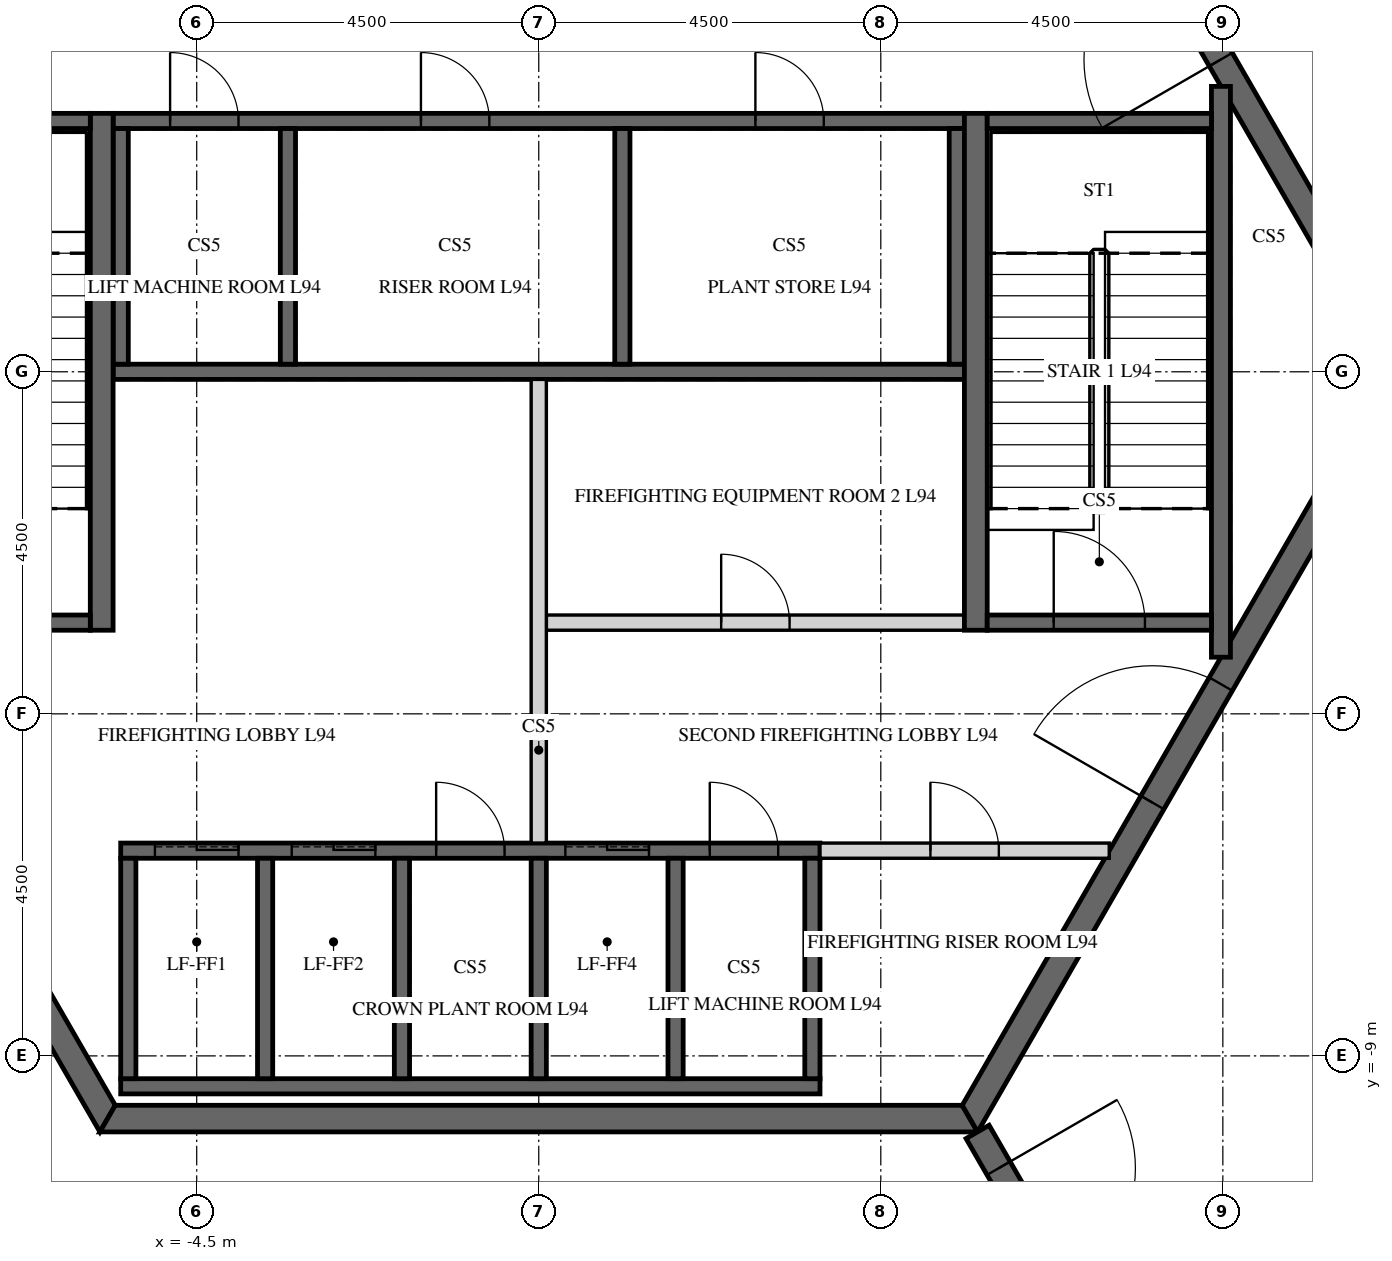
"""IFC4 building model, lengths in metres.
Left out: names, types, materials, properties, quantities, classifications, styles, units other than length and angle.
Written with IfcOpenShell. Run it as: python <this file> out.ifc"""

import sys

from ifc_helpers import new_model, si_unit, direction, frame, frame_2d, origin, place, context, subcontext, project, spatial, polyline, rectangle, outline, extrude, element, fill, save


model = new_model("IFC4")
c1 = context("Model", 3, precision=1e-05, world=origin(), true_north=direction((0.0, 1.0)))
c2 = subcontext(c1, "Body", "Model", "MODEL_VIEW")
j1 = project(units=[si_unit("LENGTHUNIT", "METRE"), si_unit("PLANEANGLEUNIT", "RADIAN")], contexts=[c1])
p1 = place(None, origin())
s1 = spatial("IfcSite", under=j1, at=p1, CompositionType="ELEMENT")
p2 = place(p1, origin())
s2 = spatial("IfcBuilding", under=s1, at=p2, CompositionType="ELEMENT")
p3 = place(p2, frame((0.0, 0.0, 397.2)))
s3 = spatial("IfcBuildingStorey", under=s2, at=p3, CompositionType="ELEMENT", Elevation=397.2)
p4 = place(p3, frame((9.618, 14.174, 4.5), z_axis=(0.0, 0.0, 1.0), x_axis=(0.559191500603, -0.8290385188, 0.0)))
e1 = element("IfcWall", 1, at=p4, inside=s3, PredefinedType="PARAPET", context=c2, shape_type="SweptSolid", body=[
    extrude(outline(polyline([(0.008, -0.1), (13.852, -0.1), (13.871, 0.1), (-0.008, 0.1), (0.008, -0.1)])), origin(), (0.0, 0.0, 1.0), 1.1),
])
p5 = place(p3, frame((-5.673, 9.825, -0.2), z_axis=(0.0, 0.0, 1.0), x_axis=(-0.499995046907, -0.866028263435, 0.0)))
e2 = element("IfcWall", 2, at=p5, inside=s3, PredefinedType="SHEAR", context=c2, shape_type="SweptSolid", body=[
    extrude(outline(polyline([(-0.101, -0.175), (11.446, -0.175), (11.244, 0.175), (0.101, 0.175), (-0.101, -0.175)])), origin(), (0.0, 0.0, 1.0), 4.5),
])
p6 = place(p5, frame((4.801, 0.0, 0.2)))
e3 = element("IfcOpeningElement", 3, at=p6, cuts=e2, PredefinedType="OPENING", context=c2, shape_type="SweptSolid", body=[
    extrude(rectangle(XDim=1.8, YDim=2.4, at=frame_2d((0.9, 1.2))), frame((0.0, 0.185, 0.0), z_axis=(0.0, -1.0, 0.0), x_axis=(1.0, 0.0, 0.0)), (0.0, 0.0, 1.0), 0.37),
])
p7 = place(p3, frame((-11.345, 0.0, -0.2), z_axis=(0.0, 0.0, 1.0), x_axis=(0.499995046907, -0.866028263435, 0.0)))
e4 = element("IfcWall", 4, at=p7, inside=s3, PredefinedType="SHEAR", context=c2, shape_type="SweptSolid", body=[
    extrude(outline(polyline([(-0.101, -0.175), (11.446, -0.175), (11.244, 0.175), (0.101, 0.175), (-0.101, -0.175)])), origin(), (0.0, 0.0, 1.0), 4.5),
])
p8 = place(p7, frame((4.744, 0.0, 0.2)))
e5 = element("IfcOpeningElement", 5, at=p8, cuts=e4, PredefinedType="OPENING", context=c2, shape_type="SweptSolid", body=[
    extrude(rectangle(XDim=1.8, YDim=2.4, at=frame_2d((0.9, 1.2))), frame((0.0, 0.185, 0.0), z_axis=(0.0, -1.0, 0.0), x_axis=(1.0, 0.0, 0.0)), (0.0, 0.0, 1.0), 0.37),
])
p9 = place(p3, frame((-5.673, -9.825, -0.2), z_axis=(0.0, 0.0, 1.0), x_axis=(1.0, 0.0, 0.0)))
e6 = element("IfcWall", 6, at=p9, inside=s3, PredefinedType="SHEAR", context=c2, shape_type="SweptSolid", body=[
    extrude(outline(polyline([(-0.101, -0.175), (11.446, -0.175), (11.244, 0.175), (0.101, 0.175), (-0.101, -0.175)])), origin(), (0.0, 0.0, 1.0), 4.5),
])
p10 = place(p3, frame((5.673, -9.825, -0.2), z_axis=(0.0, 0.0, 1.0), x_axis=(0.499995046907, 0.866028263435, 0.0)))
e7 = element("IfcWall", 7, at=p10, inside=s3, PredefinedType="SHEAR", context=c2, shape_type="SweptSolid", body=[
    extrude(outline(polyline([(-0.101, -0.175), (11.446, -0.175), (11.244, 0.175), (0.101, 0.175), (-0.101, -0.175)])), origin(), (0.0, 0.0, 1.0), 4.5),
])
p11 = place(p10, frame((4.801, 0.0, 0.2)))
e8 = element("IfcOpeningElement", 8, at=p11, cuts=e7, PredefinedType="OPENING", context=c2, shape_type="SweptSolid", body=[
    extrude(rectangle(XDim=1.8, YDim=2.4, at=frame_2d((0.9, 1.2))), frame((0.0, 0.185, 0.0), z_axis=(0.0, -1.0, 0.0), x_axis=(1.0, 0.0, 0.0)), (0.0, 0.0, 1.0), 0.37),
])
p12 = place(p3, frame((11.345, 0.0, -0.2), z_axis=(0.0, 0.0, 1.0), x_axis=(-0.499995046907, 0.866028263435, 0.0)))
e9 = element("IfcWall", 9, at=p12, inside=s3, PredefinedType="SHEAR", context=c2, shape_type="SweptSolid", body=[
    extrude(outline(polyline([(-0.101, -0.175), (11.446, -0.175), (11.244, 0.175), (0.101, 0.175), (-0.101, -0.175)])), origin(), (0.0, 0.0, 1.0), 4.5),
])
p13 = place(p12, frame((4.744, 0.0, 0.2)))
e10 = element("IfcOpeningElement", 10, at=p13, cuts=e9, PredefinedType="OPENING", context=c2, shape_type="SweptSolid", body=[
    extrude(rectangle(XDim=1.8, YDim=2.4, at=frame_2d((0.9, 1.2))), frame((0.0, 0.185, 0.0), z_axis=(0.0, -1.0, 0.0), x_axis=(1.0, 0.0, 0.0)), (0.0, 0.0, 1.0), 0.37),
])
p14 = place(p3, frame((5.773, -10.0, -0.2), z_axis=(0.0, 0.0, 1.0), x_axis=(0.499991653138, -0.866030222794, 0.0)))
e11 = element("IfcWall", 11, at=p14, inside=s3, PredefinedType="SHEAR", context=c2, shape_type="SweptSolid", body=[
    extrude(rectangle(XDim=5.705, YDim=0.35, at=frame_2d((2.852, 0.0))), origin(), (0.0, 0.0, 1.0), 4.5),
])
p15 = place(p14, frame((0.552, 0.0, 0.2)))
e12 = element("IfcOpeningElement", 12, at=p15, cuts=e11, PredefinedType="OPENING", context=c2, shape_type="SweptSolid", body=[
    extrude(rectangle(XDim=1.8, YDim=2.4, at=frame_2d((0.9, 1.2))), frame((0.0, 0.185, 0.0), z_axis=(0.0, -1.0, 0.0), x_axis=(1.0, 0.0, 0.0)), (0.0, 0.0, 1.0), 0.37),
])
p16 = place(p3, frame((-5.6, 3.3, -0.2), z_axis=(0.0, 0.0, 1.0), x_axis=(1.0, 0.0, 0.0)))
e13 = element("IfcWall", 13, at=p16, inside=s3, PredefinedType="SHEAR", context=c2, shape_type="SweptSolid", body=[
    extrude(rectangle(XDim=11.2, YDim=0.2, at=frame_2d((5.6, 0.0))), origin(), (0.0, 0.0, 1.0), 4.5),
])
p17 = place(p16, frame((0.75, 0.0, 0.2)))
e14 = element("IfcOpeningElement", 14, at=p17, cuts=e13, PredefinedType="OPENING", context=c2, shape_type="SweptSolid", body=[
    extrude(rectangle(XDim=0.9, YDim=2.1, at=frame_2d((0.45, 1.05))), frame((0.0, 0.11, 0.0), z_axis=(0.0, -1.0, 0.0), x_axis=(1.0, 0.0, 0.0)), (0.0, 0.0, 1.0), 0.22),
])
p18 = place(p16, frame((4.05, 0.0, 0.2)))
e15 = element("IfcOpeningElement", 15, at=p18, cuts=e13, PredefinedType="OPENING", context=c2, shape_type="SweptSolid", body=[
    extrude(rectangle(XDim=0.9, YDim=2.1, at=frame_2d((0.45, 1.05))), frame((0.0, 0.11, 0.0), z_axis=(0.0, -1.0, 0.0), x_axis=(1.0, 0.0, 0.0)), (0.0, 0.0, 1.0), 0.22),
])
p19 = place(p16, frame((8.45, 0.0, 0.2)))
e16 = element("IfcOpeningElement", 16, at=p19, cuts=e13, PredefinedType="OPENING", context=c2, shape_type="SweptSolid", body=[
    extrude(rectangle(XDim=0.9, YDim=2.1, at=frame_2d((0.45, 1.05))), frame((0.0, 0.11, 0.0), z_axis=(0.0, -1.0, 0.0), x_axis=(1.0, 0.0, 0.0)), (0.0, 0.0, 1.0), 0.22),
])
p20 = place(p3, frame((-5.6, 0.0, -0.2), z_axis=(0.0, 0.0, 1.0), x_axis=(1.0, 0.0, 0.0)))
e17 = element("IfcWall", 17, at=p20, inside=s3, PredefinedType="SHEAR", context=c2, shape_type="SweptSolid", body=[
    extrude(rectangle(XDim=11.2, YDim=0.2, at=frame_2d((5.6, 0.0))), origin(), (0.0, 0.0, 1.0), 4.5),
])
for number, where, z_axis, x_axis in (
    (18, (-5.5, 0.1, -0.2), (0.0, 0.0, 1.0), (0.0, 1.0, 0.0)),
    (19, (-3.3, 0.1, -0.2), (0.0, 0.0, 1.0), (0.0, 1.0, 0.0)),
    (20, (1.1, 0.1, -0.2), (0.0, 0.0, 1.0), (0.0, 1.0, 0.0)),
    (21, (5.5, 0.1, -0.2), (0.0, 0.0, 1.0), (0.0, 1.0, 0.0)),
):
    element("IfcWall", number, at=place(p3, frame(where, z_axis=z_axis, x_axis=x_axis)), inside=s3, PredefinedType="SHEAR", context=c2, shape_type="SweptSolid", body=[
        extrude(rectangle(XDim=3.1, YDim=0.2, at=frame_2d((1.55, 0.0))), origin(), (0.0, 0.0, 1.0), 4.5),
    ])
p21 = place(p3, frame((-5.5, -6.3, -0.2), z_axis=(0.0, 0.0, 1.0), x_axis=(1.0, 0.0, 0.0)))
e22 = element("IfcWall", 22, at=p21, inside=s3, PredefinedType="SHEAR", context=c2, shape_type="SweptSolid", body=[
    extrude(rectangle(XDim=9.2, YDim=0.2, at=frame_2d((4.6, 0.0))), origin(), (0.0, 0.0, 1.0), 4.5),
])
p22 = place(p21, frame((4.15, 0.0, 0.2)))
e23 = element("IfcOpeningElement", 23, at=p22, cuts=e22, PredefinedType="OPENING", context=c2, shape_type="SweptSolid", body=[
    extrude(rectangle(XDim=0.9, YDim=2.1, at=frame_2d((0.45, 1.05))), frame((0.0, 0.11, 0.0), z_axis=(0.0, -1.0, 0.0), x_axis=(1.0, 0.0, 0.0)), (0.0, 0.0, 1.0), 0.22),
])
p23 = place(p21, frame((7.75, 0.0, 0.2)))
e24 = element("IfcOpeningElement", 24, at=p23, cuts=e22, PredefinedType="OPENING", context=c2, shape_type="SweptSolid", body=[
    extrude(rectangle(XDim=0.9, YDim=2.1, at=frame_2d((0.45, 1.05))), frame((0.0, 0.11, 0.0), z_axis=(0.0, -1.0, 0.0), x_axis=(1.0, 0.0, 0.0)), (0.0, 0.0, 1.0), 0.22),
])
p24 = place(p21, frame((0.45, 0.0, 0.2)))
e25 = element("IfcOpeningElement", 25, at=p24, cuts=e22, PredefinedType="OPENING", context=c2, shape_type="SweptSolid", body=[
    extrude(rectangle(XDim=1.1, YDim=2.1, at=frame_2d((0.55, 1.05))), frame((0.0, 0.11, 0.0), z_axis=(0.0, -1.0, 0.0), x_axis=(1.0, 0.0, 0.0)), (0.0, 0.0, 1.0), 0.22),
])
p25 = place(p21, frame((2.25, 0.0, 0.2)))
e26 = element("IfcOpeningElement", 26, at=p25, cuts=e22, PredefinedType="OPENING", context=c2, shape_type="SweptSolid", body=[
    extrude(rectangle(XDim=1.1, YDim=2.1, at=frame_2d((0.55, 1.05))), frame((0.0, 0.11, 0.0), z_axis=(0.0, -1.0, 0.0), x_axis=(1.0, 0.0, 0.0)), (0.0, 0.0, 1.0), 0.22),
])
p26 = place(p21, frame((5.85, 0.0, 0.2)))
e27 = element("IfcOpeningElement", 27, at=p26, cuts=e22, PredefinedType="OPENING", context=c2, shape_type="SweptSolid", body=[
    extrude(rectangle(XDim=1.1, YDim=2.1, at=frame_2d((0.55, 1.05))), frame((0.0, 0.11, 0.0), z_axis=(0.0, -1.0, 0.0), x_axis=(1.0, 0.0, 0.0)), (0.0, 0.0, 1.0), 0.22),
])
p27 = place(p3, frame((-5.5, -9.4, -0.2), z_axis=(0.0, 0.0, 1.0), x_axis=(1.0, 0.0, 0.0)))
e28 = element("IfcWall", 28, at=p27, inside=s3, PredefinedType="SHEAR", context=c2, shape_type="SweptSolid", body=[
    extrude(rectangle(XDim=9.2, YDim=0.2, at=frame_2d((4.6, 0.0))), origin(), (0.0, 0.0, 1.0), 4.5),
])
for number, where, z_axis, x_axis in (
    (29, (-5.4, -9.3, -0.2), (0.0, 0.0, 1.0), (0.0, 1.0, 0.0)),
    (30, (-3.6, -9.3, -0.2), (0.0, 0.0, 1.0), (0.0, 1.0, 0.0)),
    (31, (-1.8, -9.3, -0.2), (0.0, 0.0, 1.0), (0.0, 1.0, 0.0)),
    (32, (0.0, -9.3, -0.2), (0.0, 0.0, 1.0), (0.0, 1.0, 0.0)),
    (33, (1.8, -9.3, -0.2), (0.0, 0.0, 1.0), (0.0, 1.0, 0.0)),
    (34, (3.6, -9.3, -0.2), (0.0, 0.0, 1.0), (0.0, 1.0, 0.0)),
):
    element("IfcWall", number, at=place(p3, frame(where, z_axis=z_axis, x_axis=x_axis)), inside=s3, PredefinedType="SHEAR", context=c2, shape_type="SweptSolid", body=[
        extrude(rectangle(XDim=2.9, YDim=0.2, at=frame_2d((1.45, 0.0))), origin(), (0.0, 0.0, 1.0), 4.5),
    ])
p28 = place(p3, frame((0.1, -3.3, 0.0), z_axis=(0.0, 0.0, 1.0), x_axis=(1.0, 0.0, 0.0)))
e35 = element("IfcWall", 35, at=p28, inside=s3, PredefinedType="PARTITIONING", context=c2, shape_type="SweptSolid", body=[
    extrude(rectangle(XDim=5.5, YDim=0.2, at=frame_2d((2.75, 0.0))), origin(), (0.0, 0.0, 1.0), 4.3),
])
p29 = place(p28, frame((2.3, 0.0, 0.0)))
e36 = element("IfcOpeningElement", 36, at=p29, cuts=e35, PredefinedType="OPENING", context=c2, shape_type="SweptSolid", body=[
    extrude(rectangle(XDim=0.9, YDim=2.1, at=frame_2d((0.45, 1.05))), frame((0.0, 0.11, 0.0), z_axis=(0.0, -1.0, 0.0), x_axis=(1.0, 0.0, 0.0)), (0.0, 0.0, 1.0), 0.22),
])
p30 = place(p3, frame((0.0, -6.2, 0.0), z_axis=(0.0, 0.0, 1.0), x_axis=(0.0, 1.0, 0.0)))
e37 = element("IfcWall", 37, at=p30, inside=s3, PredefinedType="PARTITIONING", context=c2, shape_type="SweptSolid", body=[
    extrude(rectangle(XDim=6.1, YDim=0.2, at=frame_2d((3.05, 0.0))), origin(), (0.0, 0.0, 1.0), 4.3),
])
p31 = place(p3, frame((3.7, -6.3, 0.0), z_axis=(0.0, 0.0, 1.0), x_axis=(1.0, 0.0, 0.0)))
e38 = element("IfcWall", 38, at=p31, inside=s3, PredefinedType="PARTITIONING", context=c2, shape_type="SweptSolid", body=[
    extrude(rectangle(XDim=3.806, YDim=0.2, at=frame_2d((1.903, 0.0))), origin(), (0.0, 0.0, 1.0), 4.3),
])
p32 = place(p31, frame((1.453, 0.0, 0.0)))
e39 = element("IfcOpeningElement", 39, at=p32, cuts=e38, PredefinedType="OPENING", context=c2, shape_type="SweptSolid", body=[
    extrude(rectangle(XDim=0.9, YDim=2.1, at=frame_2d((0.45, 1.05))), frame((0.0, 0.11, 0.0), z_axis=(0.0, -1.0, 0.0), x_axis=(1.0, 0.0, 0.0)), (0.0, 0.0, 1.0), 0.22),
])
p33 = place(p3, frame((5.75, -3.4, -0.2), z_axis=(0.0, 0.0, 1.0), x_axis=(0.0, 1.0, 0.0)))
e40 = element("IfcWall", 40, at=p33, inside=s3, PredefinedType="SHEAR", context=c2, shape_type="SweptSolid", body=[
    extrude(rectangle(XDim=6.8, YDim=0.3, at=frame_2d((3.4, 0.0))), origin(), (0.0, 0.0, 1.0), 4.5),
])
p34 = place(p3, frame((8.975, -3.755, -0.2), z_axis=(0.0, 0.0, 1.0), x_axis=(0.0, 1.0, 0.0)))
e41 = element("IfcWall", 41, at=p34, inside=s3, PredefinedType="SHEAR", context=c2, shape_type="SweptSolid", body=[
    extrude(rectangle(XDim=7.51, YDim=0.25, at=frame_2d((3.755, 0.0))), origin(), (0.0, 0.0, 1.0), 4.5),
])
p35 = place(p3, frame((5.9, 3.3, -0.2), z_axis=(0.0, 0.0, 1.0), x_axis=(1.0, 0.0, 0.0)))
e42 = element("IfcWall", 42, at=p35, inside=s3, PredefinedType="SHEAR", context=c2, shape_type="SweptSolid", body=[
    extrude(rectangle(XDim=2.95, YDim=0.2, at=frame_2d((1.475, 0.0))), origin(), (0.0, 0.0, 1.0), 4.5),
])
p36 = place(p3, frame((5.9, -3.3, -0.2), z_axis=(0.0, 0.0, 1.0), x_axis=(1.0, 0.0, 0.0)))
e43 = element("IfcWall", 43, at=p36, inside=s3, PredefinedType="SHEAR", context=c2, shape_type="SweptSolid", body=[
    extrude(rectangle(XDim=2.95, YDim=0.2, at=frame_2d((1.475, 0.0))), origin(), (0.0, 0.0, 1.0), 4.5),
])
p37 = place(p36, frame((0.875, 0.0, 0.2)))
e44 = element("IfcOpeningElement", 44, at=p37, cuts=e43, PredefinedType="OPENING", context=c2, shape_type="SweptSolid", body=[
    extrude(rectangle(XDim=1.2, YDim=2.4, at=frame_2d((0.6, 1.2))), frame((0.0, 0.11, 0.0), z_axis=(0.0, -1.0, 0.0), x_axis=(1.0, 0.0, 0.0)), (0.0, 0.0, 1.0), 0.22),
])
p38 = place(p3, frame((-5.75, -3.4, -0.2), z_axis=(0.0, 0.0, 1.0), x_axis=(0.0, 1.0, 0.0)))
e45 = element("IfcWall", 45, at=p38, inside=s3, PredefinedType="SHEAR", context=c2, shape_type="SweptSolid", body=[
    extrude(rectangle(XDim=6.8, YDim=0.3, at=frame_2d((3.4, 0.0))), origin(), (0.0, 0.0, 1.0), 4.5),
])
p39 = place(p3, frame((-8.85, 3.3, -0.2), z_axis=(0.0, 0.0, 1.0), x_axis=(1.0, 0.0, 0.0)))
e46 = element("IfcWall", 46, at=p39, inside=s3, PredefinedType="SHEAR", context=c2, shape_type="SweptSolid", body=[
    extrude(rectangle(XDim=2.95, YDim=0.2, at=frame_2d((1.475, 0.0))), origin(), (0.0, 0.0, 1.0), 4.5),
])
p40 = place(p3, frame((-8.85, -3.3, -0.2), z_axis=(0.0, 0.0, 1.0), x_axis=(1.0, 0.0, 0.0)))
e47 = element("IfcWall", 47, at=p40, inside=s3, PredefinedType="SHEAR", context=c2, shape_type="SweptSolid", body=[
    extrude(rectangle(XDim=2.95, YDim=0.2, at=frame_2d((1.475, 0.0))), origin(), (0.0, 0.0, 1.0), 4.5),
])
p41 = place(p40, frame((0.875, 0.0, 0.2)))
e48 = element("IfcOpeningElement", 48, at=p41, cuts=e47, PredefinedType="OPENING", context=c2, shape_type="SweptSolid", body=[
    extrude(rectangle(XDim=1.2, YDim=2.4, at=frame_2d((0.6, 1.2))), frame((0.0, 0.11, 0.0), z_axis=(0.0, -1.0, 0.0), x_axis=(1.0, 0.0, 0.0)), (0.0, 0.0, 1.0), 0.22),
])
p42 = place(p13, origin())
e49 = element("IfcDoor", 49, at=p42, inside=s3, OperationType="DOUBLE_DOOR_SINGLE_SWING", PredefinedType="DOOR", context=c2, shape_type="SweptSolid", body=[
    extrude(rectangle(XDim=1.8, YDim=2.4, at=frame_2d((0.9, 1.2))), frame((0.0, 0.025, 0.0), z_axis=(0.0, -1.0, 0.0), x_axis=(1.0, 0.0, 0.0)), (0.0, 0.0, 1.0), 0.05),
])
fill(e10, e49)
p43 = place(p11, origin())
e50 = element("IfcDoor", 50, at=p43, inside=s3, OperationType="DOUBLE_DOOR_SINGLE_SWING", PredefinedType="DOOR", context=c2, shape_type="SweptSolid", body=[
    extrude(rectangle(XDim=1.8, YDim=2.4, at=frame_2d((0.9, 1.2))), frame((0.0, 0.025, 0.0), z_axis=(0.0, -1.0, 0.0), x_axis=(1.0, 0.0, 0.0)), (0.0, 0.0, 1.0), 0.05),
])
fill(e8, e50)
p44 = place(p15, origin())
e51 = element("IfcDoor", 51, at=p44, inside=s3, OperationType="DOUBLE_DOOR_SINGLE_SWING", PredefinedType="DOOR", context=c2, shape_type="SweptSolid", body=[
    extrude(rectangle(XDim=1.8, YDim=2.4, at=frame_2d((0.9, 1.2))), frame((0.0, 0.025, 0.0), z_axis=(0.0, -1.0, 0.0), x_axis=(1.0, 0.0, 0.0)), (0.0, 0.0, 1.0), 0.05),
])
fill(e12, e51)
p45 = place(p29, origin())
e52 = element("IfcDoor", 52, at=p45, inside=s3, OperationType="SINGLE_SWING_LEFT", PredefinedType="DOOR", context=c2, shape_type="SweptSolid", body=[
    extrude(rectangle(XDim=0.9, YDim=2.1, at=frame_2d((0.45, 1.05))), frame((0.0, 0.025, 0.0), z_axis=(0.0, -1.0, 0.0), x_axis=(1.0, 0.0, 0.0)), (0.0, 0.0, 1.0), 0.05),
])
fill(e36, e52)
p46 = place(p32, origin())
e53 = element("IfcDoor", 53, at=p46, inside=s3, OperationType="SINGLE_SWING_LEFT", PredefinedType="DOOR", context=c2, shape_type="SweptSolid", body=[
    extrude(rectangle(XDim=0.9, YDim=2.1, at=frame_2d((0.45, 1.05))), frame((0.0, 0.025, 0.0), z_axis=(0.0, -1.0, 0.0), x_axis=(1.0, 0.0, 0.0)), (0.0, 0.0, 1.0), 0.05),
])
fill(e39, e53)
p47 = place(p17, origin())
e54 = element("IfcDoor", 54, at=p47, inside=s3, OperationType="SINGLE_SWING_LEFT", PredefinedType="DOOR", context=c2, shape_type="SweptSolid", body=[
    extrude(rectangle(XDim=0.9, YDim=2.1, at=frame_2d((0.45, 1.05))), frame((0.0, 0.025, 0.0), z_axis=(0.0, -1.0, 0.0), x_axis=(1.0, 0.0, 0.0)), (0.0, 0.0, 1.0), 0.05),
])
fill(e14, e54)
p48 = place(p18, origin())
e55 = element("IfcDoor", 55, at=p48, inside=s3, OperationType="SINGLE_SWING_LEFT", PredefinedType="DOOR", context=c2, shape_type="SweptSolid", body=[
    extrude(rectangle(XDim=0.9, YDim=2.1, at=frame_2d((0.45, 1.05))), frame((0.0, 0.025, 0.0), z_axis=(0.0, -1.0, 0.0), x_axis=(1.0, 0.0, 0.0)), (0.0, 0.0, 1.0), 0.05),
])
fill(e15, e55)
p49 = place(p19, origin())
e56 = element("IfcDoor", 56, at=p49, inside=s3, OperationType="SINGLE_SWING_LEFT", PredefinedType="DOOR", context=c2, shape_type="SweptSolid", body=[
    extrude(rectangle(XDim=0.9, YDim=2.1, at=frame_2d((0.45, 1.05))), frame((0.0, 0.025, 0.0), z_axis=(0.0, -1.0, 0.0), x_axis=(1.0, 0.0, 0.0)), (0.0, 0.0, 1.0), 0.05),
])
fill(e16, e56)
p50 = place(p22, origin())
e57 = element("IfcDoor", 57, at=p50, inside=s3, OperationType="SINGLE_SWING_LEFT", PredefinedType="DOOR", context=c2, shape_type="SweptSolid", body=[
    extrude(rectangle(XDim=0.9, YDim=2.1, at=frame_2d((0.45, 1.05))), frame((0.0, 0.025, 0.0), z_axis=(0.0, -1.0, 0.0), x_axis=(1.0, 0.0, 0.0)), (0.0, 0.0, 1.0), 0.05),
])
fill(e23, e57)
p51 = place(p23, origin())
e58 = element("IfcDoor", 58, at=p51, inside=s3, OperationType="SINGLE_SWING_LEFT", PredefinedType="DOOR", context=c2, shape_type="SweptSolid", body=[
    extrude(rectangle(XDim=0.9, YDim=2.1, at=frame_2d((0.45, 1.05))), frame((0.0, 0.025, 0.0), z_axis=(0.0, -1.0, 0.0), x_axis=(1.0, 0.0, 0.0)), (0.0, 0.0, 1.0), 0.05),
])
fill(e24, e58)
p52 = place(p37, origin())
e59 = element("IfcDoor", 59, at=p52, inside=s3, OperationType="SINGLE_SWING_LEFT", PredefinedType="DOOR", context=c2, shape_type="SweptSolid", body=[
    extrude(rectangle(XDim=1.2, YDim=2.4, at=frame_2d((0.6, 1.2))), frame((0.0, 0.025, 0.0), z_axis=(0.0, -1.0, 0.0), x_axis=(1.0, 0.0, 0.0)), (0.0, 0.0, 1.0), 0.05),
])
fill(e44, e59)
p53 = place(p24, origin())
e60 = element("IfcDoor", 60, at=p53, inside=s3, OperationType="SLIDING_TO_LEFT", PredefinedType="DOOR", context=c2, shape_type="SweptSolid", body=[
    extrude(rectangle(XDim=1.1, YDim=2.1, at=frame_2d((0.55, 1.05))), frame((0.0, 0.025, 0.0), z_axis=(0.0, -1.0, 0.0), x_axis=(1.0, 0.0, 0.0)), (0.0, 0.0, 1.0), 0.05),
])
fill(e25, e60)
p54 = place(p25, origin())
e61 = element("IfcDoor", 61, at=p54, inside=s3, OperationType="SLIDING_TO_LEFT", PredefinedType="DOOR", context=c2, shape_type="SweptSolid", body=[
    extrude(rectangle(XDim=1.1, YDim=2.1, at=frame_2d((0.55, 1.05))), frame((0.0, 0.025, 0.0), z_axis=(0.0, -1.0, 0.0), x_axis=(1.0, 0.0, 0.0)), (0.0, 0.0, 1.0), 0.05),
])
fill(e26, e61)
p55 = place(p26, origin())
e62 = element("IfcDoor", 62, at=p55, inside=s3, OperationType="SLIDING_TO_LEFT", PredefinedType="DOOR", context=c2, shape_type="SweptSolid", body=[
    extrude(rectangle(XDim=1.1, YDim=2.1, at=frame_2d((0.55, 1.05))), frame((0.0, 0.025, 0.0), z_axis=(0.0, -1.0, 0.0), x_axis=(1.0, 0.0, 0.0)), (0.0, 0.0, 1.0), 0.05),
])
fill(e27, e62)
save(model, sys.argv[1])
